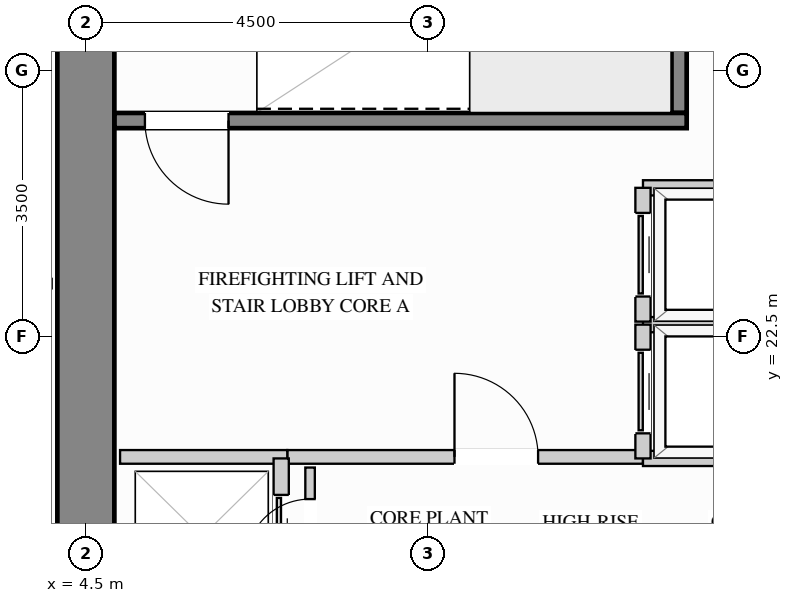
"""IFC4 building model, lengths in metres.
Left out: names, types, materials, properties, quantities, classifications, styles, units other than length and angle.
Written with IfcOpenShell. Run it as: python <this file> out.ifc"""

import sys

from ifc_helpers import new_model, si_unit, direction, frame, frame_2d, origin, place, context, subcontext, project, spatial, rectangle, extrude, source, transform, mapped, element, fill, save


model = new_model("IFC4")
c1 = context("Model", 3, precision=1e-05, world=origin(), true_north=direction((0.0, 1.0)))
c2 = subcontext(c1, "Body", "Model", "MODEL_VIEW")
j1 = project(units=[si_unit("LENGTHUNIT", "METRE"), si_unit("PLANEANGLEUNIT", "RADIAN")], contexts=[c1])
p1 = place(None, origin())
s1 = spatial("IfcSite", under=j1, at=p1, CompositionType="ELEMENT")
p2 = place(p1, origin())
s2 = spatial("IfcBuilding", under=s1, at=p2, CompositionType="ELEMENT")
p3 = place(p2, frame((0.0, 0.0, 88.2)))
s3 = spatial("IfcBuildingStorey", under=s2, at=p3, CompositionType="ELEMENT", Elevation=88.2)
m1 = source(origin(), c2, "Body", "SweptSolid", [
    extrude(rectangle(XDim=20.25, YDim=0.75, at=frame_2d((10.125, 0.0))), origin(), (0.0, 0.0, 1.0), 3.38),
])
p4 = place(p3, frame((4.5, 8.875, 0.0), z_axis=(0.0, 0.0, 1.0), x_axis=(0.0, 1.0, 0.0)))
e1 = element("IfcWall", 1, at=p4, inside=s3, PredefinedType="SHEAR", context=c2, shape_type="MappedRepresentation", body=[
    mapped(m1, transform((0.0, 0.0, 0.0), x_axis=(1.0, 0.0, 0.0), y_axis=(0.0, 1.0, 0.0), z_axis=(0.0, 0.0, 1.0))),
])
p5 = place(p3, frame((7.15, 20.92, 0.0), z_axis=(0.0, 0.0, 1.0), x_axis=(1.0, 0.0, 0.0)))
e2 = element("IfcWall", 2, at=p5, inside=s3, PredefinedType="PARTITIONING", context=c2, shape_type="SweptSolid", body=[
    extrude(rectangle(XDim=4.68, YDim=0.18, at=frame_2d((2.34, 0.0))), origin(), (0.0, 0.0, 1.0), 3.365),
])
p6 = place(p5, frame((2.2, 0.0, 0.0)))
e3 = element("IfcOpeningElement", 3, at=p6, cuts=e2, PredefinedType="OPENING", context=c2, shape_type="SweptSolid", body=[
    extrude(rectangle(XDim=1.1, YDim=2.15, at=frame_2d((0.55, 1.075))), frame((0.0, 0.1, 0.0), z_axis=(0.0, -1.0, 0.0), x_axis=(1.0, 0.0, 0.0)), (0.0, 0.0, 1.0), 0.2),
])
m2 = source(origin(), c2, "Body", "SweptSolid", [
    extrude(rectangle(XDim=2.2, YDim=0.18, at=frame_2d((1.1, 0.0))), origin(), (0.0, 0.0, 1.0), 3.365),
])
p7 = place(p3, frame((4.95, 20.92, 0.0), z_axis=(0.0, 0.0, 1.0), x_axis=(1.0, 0.0, 0.0)))
e4 = element("IfcWall", 4, at=p7, inside=s3, PredefinedType="PARTITIONING", context=c2, shape_type="MappedRepresentation", body=[
    mapped(m2, transform((0.0, 0.0, 0.0), x_axis=(1.0, 0.0, 0.0), y_axis=(0.0, 1.0, 0.0), z_axis=(0.0, 0.0, 1.0))),
])
p8 = place(p3, frame((7.45, 19.2, 0.0), z_axis=(0.0, 0.0, 1.0), x_axis=(0.0, 1.0, 0.0)))
e5 = element("IfcWall", 5, at=p8, inside=s3, PredefinedType="PARTITIONING", context=c2, shape_type="SweptSolid", body=[
    extrude(rectangle(XDim=1.58, YDim=0.125, at=frame_2d((0.79, 0.0))), origin(), (0.0, 0.0, 1.0), 3.365),
])
p9 = place(p8, frame((0.315, 0.0, 0.0)))
e6 = element("IfcOpeningElement", 6, at=p9, cuts=e5, PredefinedType="OPENING", context=c2, shape_type="SweptSolid", body=[
    extrude(rectangle(XDim=0.85, YDim=2.1, at=frame_2d((0.425, 1.05))), frame((0.0, 0.073, 0.0), z_axis=(0.0, -1.0, 0.0), x_axis=(1.0, 0.0, 0.0)), (0.0, 0.0, 1.0), 0.145),
])
m3 = source(origin(), c2, "Body", "SweptSolid", [
    extrude(rectangle(XDim=3.698, YDim=0.125, at=frame_2d((1.849, 0.0))), origin(), (0.0, 0.0, 1.0), 3.365),
])
p10 = place(p3, frame((0.352, 23.2, 0.0), z_axis=(0.0, 0.0, 1.0), x_axis=(1.0, 0.0, 0.0)))
e7 = element("IfcWall", 7, at=p10, inside=s3, PredefinedType="PARTITIONING", context=c2, shape_type="MappedRepresentation", body=[
    mapped(m3, transform((0.0, 0.0, 0.0), x_axis=(1.0, 0.0, 0.0), y_axis=(0.0, 1.0, 0.0), z_axis=(0.0, 0.0, 1.0))),
])
m4 = source(origin(), c2, "Body", "SweptSolid", [
    extrude(rectangle(XDim=2.265, YDim=0.2, at=frame_2d((1.132, 0.0))), origin(), (0.0, 0.0, 1.0), 3.365),
])
for number, where, z_axis, x_axis in (
    (8, (11.83, 22.66, 0.0), (0.0, 0.0, 1.0), (1.0, 0.0, 0.0)),
    (9, (11.83, 20.9, 0.0), (0.0, 0.0, 1.0), (1.0, 0.0, 0.0)),
):
    element("IfcWall", number, at=place(p3, frame(where, z_axis=z_axis, x_axis=x_axis)), inside=s3, PredefinedType="PARTITIONING", context=c2, shape_type="MappedRepresentation", body=[
        mapped(m4, transform((0.0, 0.0, 0.0), x_axis=(1.0, 0.0, 0.0), y_axis=(0.0, 1.0, 0.0), z_axis=(0.0, 0.0, 1.0))),
    ])
p11 = place(p3, frame((11.83, 20.9, 0.0), z_axis=(0.0, 0.0, 1.0), x_axis=(0.0, 1.0, 0.0)))
e10 = element("IfcWall", 10, at=p11, inside=s3, PredefinedType="PARTITIONING", context=c2, shape_type="SweptSolid", body=[
    extrude(rectangle(XDim=1.76, YDim=0.2, at=frame_2d((0.88, 0.0))), origin(), (0.0, 0.0, 1.0), 3.365),
])
p12 = place(p11, frame((0.33, 0.0, 0.0)))
e11 = element("IfcOpeningElement", 11, at=p12, cuts=e10, PredefinedType="OPENING", context=c2, shape_type="SweptSolid", body=[
    extrude(rectangle(XDim=1.1, YDim=2.2, at=frame_2d((0.55, 1.1))), frame((0.0, 0.11, 0.0), z_axis=(0.0, -1.0, 0.0), x_axis=(1.0, 0.0, 0.0)), (0.0, 0.0, 1.0), 0.22),
])
p13 = place(p3, frame((11.83, 24.46, 0.0), z_axis=(0.0, 0.0, 1.0), x_axis=(1.0, 0.0, 0.0)))
e12 = element("IfcWall", 12, at=p13, inside=s3, PredefinedType="PARTITIONING", context=c2, shape_type="MappedRepresentation", body=[
    mapped(m4, transform((0.0, 0.0, 0.0), x_axis=(1.0, 0.0, 0.0), y_axis=(0.0, 1.0, 0.0), z_axis=(0.0, 0.0, 1.0))),
])
p14 = place(p3, frame((11.83, 22.7, 0.0), z_axis=(0.0, 0.0, 1.0), x_axis=(0.0, 1.0, 0.0)))
e13 = element("IfcWall", 13, at=p14, inside=s3, PredefinedType="PARTITIONING", context=c2, shape_type="SweptSolid", body=[
    extrude(rectangle(XDim=1.76, YDim=0.2, at=frame_2d((0.88, 0.0))), origin(), (0.0, 0.0, 1.0), 3.365),
])
p15 = place(p14, frame((0.33, 0.0, 0.0)))
e14 = element("IfcOpeningElement", 14, at=p15, cuts=e13, PredefinedType="OPENING", context=c2, shape_type="SweptSolid", body=[
    extrude(rectangle(XDim=1.1, YDim=2.2, at=frame_2d((0.55, 1.1))), frame((0.0, 0.11, 0.0), z_axis=(0.0, -1.0, 0.0), x_axis=(1.0, 0.0, 0.0)), (0.0, 0.0, 1.0), 0.22),
])
p16 = place(p3, frame((7.07, 18.84, 0.0), z_axis=(0.0, 0.0, 1.0), x_axis=(0.0, 1.0, 0.0)))
e15 = element("IfcWall", 15, at=p16, inside=s3, PredefinedType="PARTITIONING", context=c2, shape_type="SweptSolid", body=[
    extrude(rectangle(XDim=2.06, YDim=0.2, at=frame_2d((1.03, 0.0))), origin(), (0.0, 0.0, 1.0), 3.365),
])
p17 = place(p16, frame((0.48, 0.0, 0.0)))
e16 = element("IfcOpeningElement", 16, at=p17, cuts=e15, PredefinedType="OPENING", context=c2, shape_type="SweptSolid", body=[
    extrude(rectangle(XDim=1.1, YDim=2.2, at=frame_2d((0.55, 1.1))), frame((0.0, 0.11, 0.0), z_axis=(0.0, -1.0, 0.0), x_axis=(1.0, 0.0, 0.0)), (0.0, 0.0, 1.0), 0.22),
])
m5 = source(origin(), c2, "Body", "SweptSolid", [
    extrude(rectangle(XDim=3.678, YDim=0.2, at=frame_2d((1.839, 0.0))), origin(), (0.0, 0.0, 1.0), 3.38),
])
p18 = place(p3, frame((12.305, 25.445, 0.0), z_axis=(0.0, 0.0, 1.0), x_axis=(0.0, 1.0, 0.0)))
e17 = element("IfcWall", 17, at=p18, inside=s3, PredefinedType="SHEAR", context=c2, shape_type="MappedRepresentation", body=[
    mapped(m5, transform((0.0, 0.0, 0.0), x_axis=(1.0, 0.0, 0.0), y_axis=(0.0, 1.0, 0.0), z_axis=(0.0, 0.0, 1.0))),
])
p19 = place(p3, frame((4.877, 25.345, 0.0), z_axis=(0.0, 0.0, 1.0), x_axis=(1.0, 0.0, 0.0)))
e18 = element("IfcWall", 18, at=p19, inside=s3, PredefinedType="SHEAR", context=c2, shape_type="SweptSolid", body=[
    extrude(rectangle(XDim=7.528, YDim=0.2, at=frame_2d((3.764, 0.0))), origin(), (0.0, 0.0, 1.0), 3.38),
])
p20 = place(p19, frame((0.4, 0.0, 0.0)))
e19 = element("IfcOpeningElement", 19, at=p20, cuts=e18, PredefinedType="OPENING", context=c2, shape_type="SweptSolid", body=[
    extrude(rectangle(XDim=1.1, YDim=2.15, at=frame_2d((0.55, 1.075))), frame((0.0, 0.11, 0.0), z_axis=(0.0, -1.0, 0.0), x_axis=(1.0, 0.0, 0.0)), (0.0, 0.0, 1.0), 0.22),
])
m6 = source(origin(), c2, "Body", "SweptSolid", [
    extrude(rectangle(XDim=1.1, YDim=2.15, at=frame_2d((0.55, 1.075))), frame((0.0, 0.025, 0.0), z_axis=(0.0, -1.0, 0.0), x_axis=(1.0, 0.0, 0.0)), (0.0, 0.0, 1.0), 0.05),
])
p21 = place(p6, origin())
e20 = element("IfcDoor", 20, at=p21, inside=s3, OperationType="SINGLE_SWING_LEFT", PredefinedType="DOOR", context=c2, shape_type="MappedRepresentation", body=[
    mapped(m6, transform((0.0, 0.0, 0.0), x_axis=(1.0, 0.0, 0.0), y_axis=(0.0, 1.0, 0.0), z_axis=(0.0, 0.0, 1.0))),
])
fill(e3, e20)
m7 = source(origin(), c2, "Body", "SweptSolid", [
    extrude(rectangle(XDim=1.1, YDim=2.2, at=frame_2d((0.55, 1.1))), frame((0.0, 0.025, 0.0), z_axis=(0.0, -1.0, 0.0), x_axis=(1.0, 0.0, 0.0)), (0.0, 0.0, 1.0), 0.05),
])
p22 = place(p12, origin())
e21 = element("IfcDoor", 21, at=p22, inside=s3, OperationType="SLIDING_TO_LEFT", PredefinedType="DOOR", context=c2, shape_type="MappedRepresentation", body=[
    mapped(m7, transform((0.0, 0.0, 0.0), x_axis=(1.0, 0.0, 0.0), y_axis=(0.0, 1.0, 0.0), z_axis=(0.0, 0.0, 1.0))),
])
fill(e11, e21)
p23 = place(p15, origin())
e22 = element("IfcDoor", 22, at=p23, inside=s3, OperationType="SLIDING_TO_LEFT", PredefinedType="DOOR", context=c2, shape_type="MappedRepresentation", body=[
    mapped(m7, transform((0.0, 0.0, 0.0), x_axis=(1.0, 0.0, 0.0), y_axis=(0.0, 1.0, 0.0), z_axis=(0.0, 0.0, 1.0))),
])
fill(e14, e22)
p24 = place(p17, origin())
e23 = element("IfcDoor", 23, at=p24, inside=s3, OperationType="SLIDING_TO_LEFT", PredefinedType="DOOR", context=c2, shape_type="MappedRepresentation", body=[
    mapped(m7, transform((0.0, 0.0, 0.0), x_axis=(1.0, 0.0, 0.0), y_axis=(0.0, 1.0, 0.0), z_axis=(0.0, 0.0, 1.0))),
])
fill(e16, e23)
m8 = source(origin(), c2, "Body", "SweptSolid", [
    extrude(rectangle(XDim=0.85, YDim=2.1, at=frame_2d((0.425, 1.05))), frame((0.0, 0.025, 0.0), z_axis=(0.0, -1.0, 0.0), x_axis=(1.0, 0.0, 0.0)), (0.0, 0.0, 1.0), 0.05),
])
p25 = place(p9, origin())
e24 = element("IfcDoor", 24, at=p25, inside=s3, OperationType="SINGLE_SWING_LEFT", PredefinedType="DOOR", context=c2, shape_type="MappedRepresentation", body=[
    mapped(m8, transform((0.0, 0.0, 0.0), x_axis=(1.0, 0.0, 0.0), y_axis=(0.0, 1.0, 0.0), z_axis=(0.0, 0.0, 1.0))),
])
fill(e6, e24)
m9 = source(origin(), c2, "Body", "SweptSolid", [
    extrude(rectangle(XDim=1.1, YDim=2.15, at=frame_2d((0.55, 1.075))), frame((0.0, 0.025, 0.0), z_axis=(0.0, -1.0, 0.0), x_axis=(1.0, 0.0, 0.0)), (0.0, 0.0, 1.0), 0.05),
])
p26 = place(p20, origin())
e25 = element("IfcDoor", 25, at=p26, inside=s3, OperationType="SINGLE_SWING_RIGHT", PredefinedType="DOOR", context=c2, shape_type="MappedRepresentation", body=[
    mapped(m9, transform((0.0, 0.0, 0.0), x_axis=(1.0, 0.0, 0.0), y_axis=(0.0, 1.0, 0.0), z_axis=(0.0, 0.0, 1.0))),
])
fill(e19, e25)
save(model, sys.argv[1])
